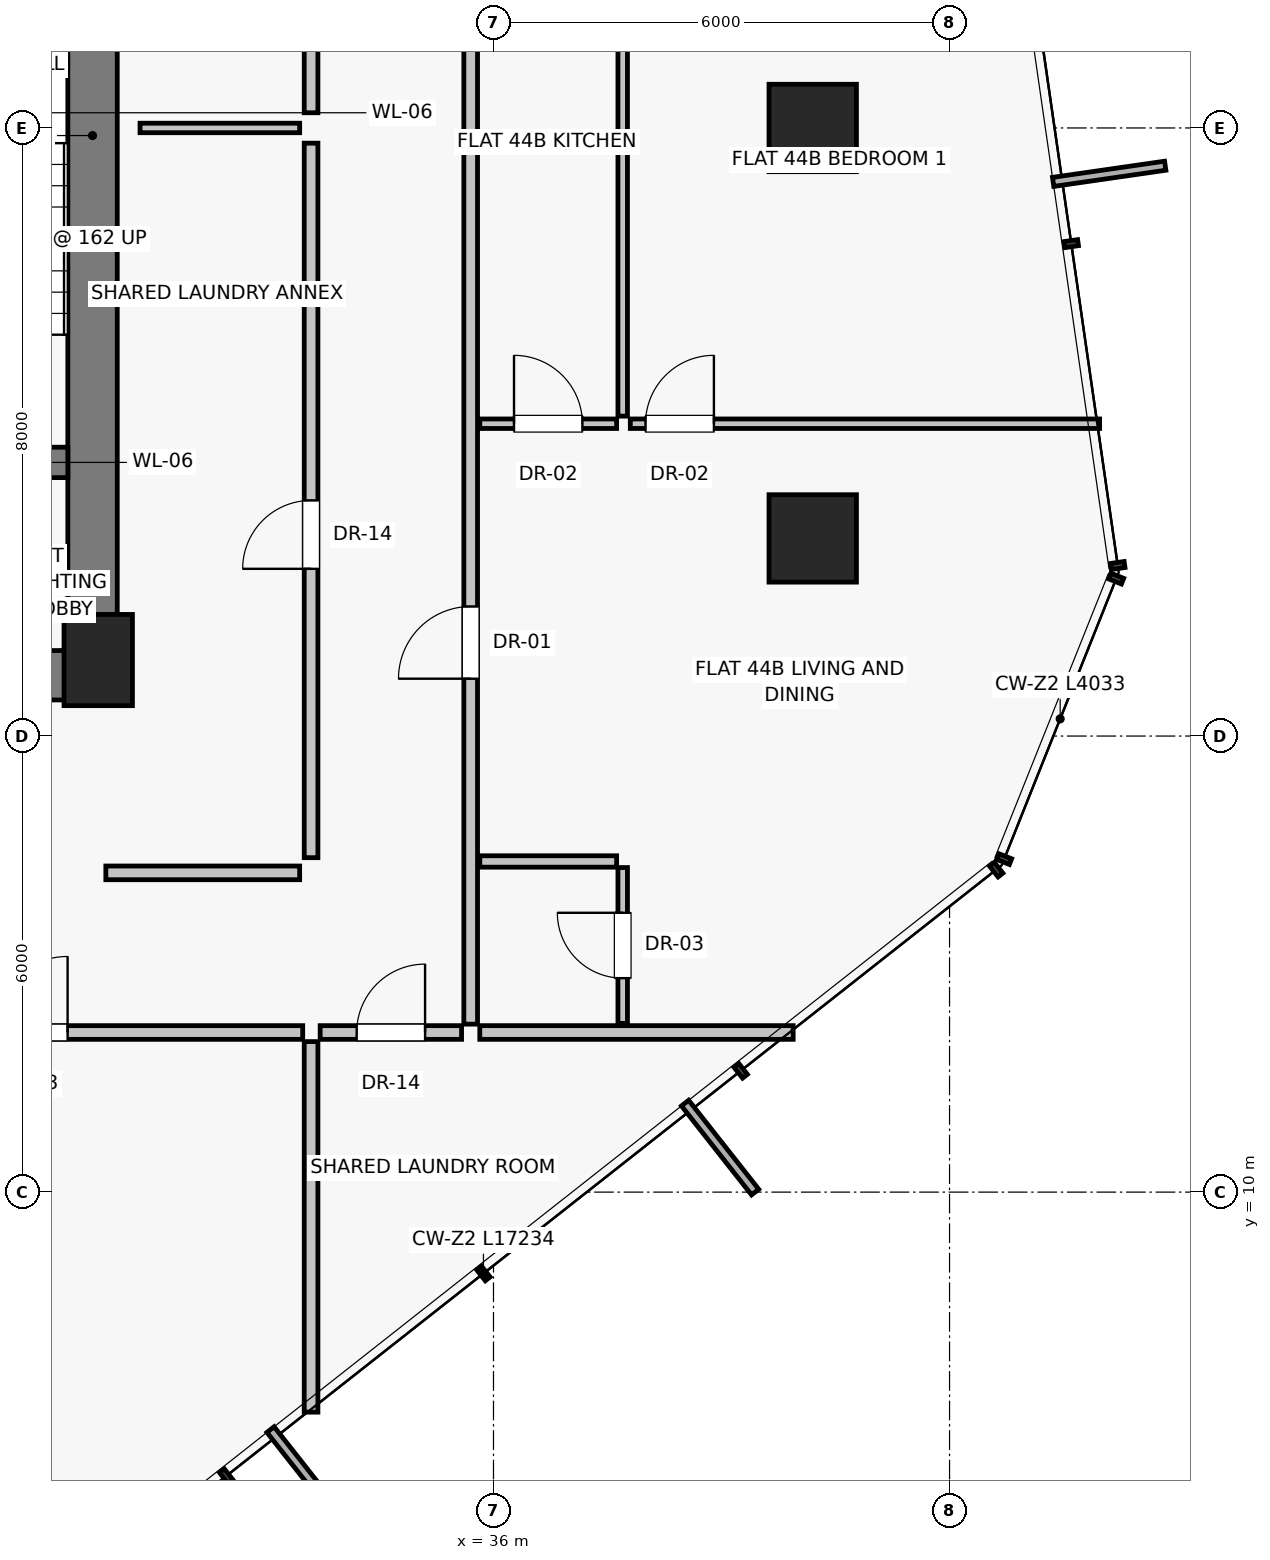
"""IFC4 building model, lengths in metres.
Left out: names, types, materials, properties, quantities, classifications, styles, units other than length and angle.
Written with IfcOpenShell. Run it as: python <this file> out.ifc"""

import sys

from ifc_helpers import new_model, si_unit, direction, frame, frame_2d, origin, origin_2d, place, context, subcontext, project, spatial, rectangle, extrude, source, transform, mapped, element, fill, save


model = new_model("IFC4")
c1 = context("Model", 3, precision=1e-05, world=origin(), true_north=direction((0.0, 1.0)))
c2 = subcontext(c1, "Body", "Model", "MODEL_VIEW")
j1 = project(units=[si_unit("LENGTHUNIT", "METRE"), si_unit("PLANEANGLEUNIT", "RADIAN")], contexts=[c1])
p1 = place(None, origin())
s1 = spatial("IfcSite", under=j1, at=p1, CompositionType="ELEMENT")
p2 = place(p1, origin())
s2 = spatial("IfcBuilding", under=s1, at=p2, CompositionType="ELEMENT")
p3 = place(p2, frame((0.0, 0.0, 155.5)))
s3 = spatial("IfcBuildingStorey", under=s2, at=p3, CompositionType="ELEMENT", Elevation=155.5)
p4 = place(p3, frame((30.8, 17.0, 0.0), z_axis=(0.0, 0.0, 1.0), x_axis=(1.0, 0.0, 0.0)))
e1 = element("IfcColumn", 1, at=p4, inside=s3, PredefinedType="PILASTER", context=c2, shape_type="SweptSolid", body=[
    extrude(rectangle(XDim=0.9, YDim=1.2, at=origin_2d()), origin(), (0.0, 0.0, 1.0), 3.25),
])
for number, where, z_axis, x_axis in (
    (2, (40.2, 18.6, 0.0), (0.0, 0.0, 1.0), (1.0, 0.0, 0.0)),
    (3, (40.2, 24.0, 0.0), (0.0, 0.0, 1.0), (1.0, 0.0, 0.0)),
):
    element("IfcColumn", number, at=place(p3, frame(where, z_axis=z_axis, x_axis=x_axis)), inside=s3, PredefinedType="COLUMN", context=c2, shape_type="SweptSolid", body=[
        extrude(rectangle(XDim=1.15, YDim=1.15, at=origin_2d()), origin(), (0.0, 0.0, 1.0), 3.25),
    ])
p5 = place(p3, frame((30.725, 16.8, 0.0), z_axis=(0.0, 0.0, 1.0), x_axis=(0.0, 1.0, 0.0)))
e4 = element("IfcWall", 4, at=p5, inside=s3, PredefinedType="SHEAR", context=c2, shape_type="SweptSolid", body=[
    extrude(rectangle(XDim=14.2, YDim=0.65, at=frame_2d((7.1, 0.0))), origin(), (0.0, 0.0, 1.0), 2.97),
])
p6 = place(p3, frame((24.95, 16.8, 0.0), z_axis=(0.0, 0.0, 1.0), x_axis=(1.0, 0.0, 0.0)))
e5 = element("IfcWall", 5, at=p6, inside=s3, PredefinedType="SHEAR", context=c2, shape_type="SweptSolid", body=[
    extrude(rectangle(XDim=5.85, YDim=0.65, at=frame_2d((2.925, 0.0))), origin(), (0.0, 0.0, 1.0), 2.97),
])
p7 = place(p6, frame((2.15, 0.0, 0.0)))
e6 = element("IfcOpeningElement", 6, at=p7, cuts=e5, PredefinedType="OPENING", context=c2, shape_type="SweptSolid", body=[
    extrude(rectangle(XDim=1.2, YDim=2.03, at=frame_2d((0.6, 1.015))), frame((0.0, 0.335, 0.0), z_axis=(0.0, -1.0, 0.0), x_axis=(1.0, 0.0, 0.0)), (0.0, 0.0, 1.0), 0.67),
])
p8 = place(p3, frame((27.0, 19.6, 0.0), z_axis=(0.0, 0.0, 1.0), x_axis=(1.0, 0.0, 0.0)))
e7 = element("IfcWall", 7, at=p8, inside=s3, PredefinedType="SHEAR", context=c2, shape_type="SweptSolid", body=[
    extrude(rectangle(XDim=3.4, YDim=0.4, at=frame_2d((1.7, 0.0))), origin(), (0.0, 0.0, 1.0), 2.97),
])
p9 = place(p8, frame((1.05, 0.0, 0.0)))
e8 = element("IfcOpeningElement", 8, at=p9, cuts=e7, PredefinedType="OPENING", context=c2, shape_type="SweptSolid", body=[
    extrude(rectangle(XDim=1.1, YDim=2.03, at=frame_2d((0.55, 1.015))), frame((0.0, 0.21, 0.0), z_axis=(0.0, -1.0, 0.0), x_axis=(1.0, 0.0, 0.0)), (0.0, 0.0, 1.0), 0.42),
])
p10 = place(p3, frame((33.6, 14.4, 0.0), z_axis=(0.0, 0.0, 1.0), x_axis=(0.0, 1.0, 0.0)))
e9 = element("IfcWall", 9, at=p10, inside=s3, PredefinedType="PARTITIONING", context=c2, shape_type="SweptSolid", body=[
    extrude(rectangle(XDim=9.4, YDim=0.18, at=frame_2d((4.7, 0.0))), origin(), (0.0, 0.0, 1.0), 2.97),
])
p11 = place(p10, frame((3.8, 0.0, 0.0)))
e10 = element("IfcOpeningElement", 10, at=p11, cuts=e9, PredefinedType="OPENING", context=c2, shape_type="SweptSolid", body=[
    extrude(rectangle(XDim=0.9, YDim=2.01, at=frame_2d((0.45, 1.005))), frame((0.0, 0.1, 0.0), z_axis=(0.0, -1.0, 0.0), x_axis=(1.0, 0.0, 0.0)), (0.0, 0.0, 1.0), 0.2),
])
p12 = place(p3, frame((33.6, 24.2, 0.0), z_axis=(0.0, 0.0, 1.0), x_axis=(0.0, 1.0, 0.0)))
e11 = element("IfcWall", 11, at=p12, inside=s3, PredefinedType="PARTITIONING", context=c2, shape_type="SweptSolid", body=[
    extrude(rectangle(XDim=9.2, YDim=0.18, at=frame_2d((4.6, 0.0))), origin(), (0.0, 0.0, 1.0), 2.97),
])
p13 = place(p12, frame((3.8, 0.0, 0.0)))
e12 = element("IfcOpeningElement", 12, at=p13, cuts=e11, PredefinedType="OPENING", context=c2, shape_type="SweptSolid", body=[
    extrude(rectangle(XDim=0.9, YDim=2.01, at=frame_2d((0.45, 1.005))), frame((0.0, 0.1, 0.0), z_axis=(0.0, -1.0, 0.0), x_axis=(1.0, 0.0, 0.0)), (0.0, 0.0, 1.0), 0.2),
])
p14 = place(p3, frame((31.35, 24.0, 0.0), z_axis=(0.0, 0.0, 1.0), x_axis=(1.0, 0.0, 0.0)))
e13 = element("IfcWall", 13, at=p14, inside=s3, PredefinedType="PARTITIONING", context=c2, shape_type="SweptSolid", body=[
    extrude(rectangle(XDim=2.1, YDim=0.125, at=frame_2d((1.05, 0.0))), origin(), (0.0, 0.0, 1.0), 2.97),
])
p15 = place(p3, frame((30.9, 14.2, 0.0), z_axis=(0.0, 0.0, 1.0), x_axis=(1.0, 0.0, 0.0)))
e14 = element("IfcWall", 14, at=p15, inside=s3, PredefinedType="PARTITIONING", context=c2, shape_type="SweptSolid", body=[
    extrude(rectangle(XDim=2.55, YDim=0.18, at=frame_2d((1.275, 0.0))), origin(), (0.0, 0.0, 1.0), 2.97),
])
p16 = place(p3, frame((33.6, 11.98, 0.0), z_axis=(0.0, 0.0, 1.0), x_axis=(0.0, -1.0, 0.0)))
e15 = element("IfcWall", 15, at=p16, inside=s3, PredefinedType="PARTITIONING", context=c2, shape_type="SweptSolid", body=[
    extrude(rectangle(XDim=4.875, YDim=0.18, at=frame_2d((2.437, 0.0))), origin(), (0.0, 0.0, 1.0), 2.97),
])
p17 = place(p3, frame((26.304, 12.1, 0.0), z_axis=(0.0, 0.0, 1.0), x_axis=(1.0, 0.0, 0.0)))
e16 = element("IfcWall", 16, at=p17, inside=s3, PredefinedType="PARTITIONING", context=c2, shape_type="SweptSolid", body=[
    extrude(rectangle(XDim=7.186, YDim=0.18, at=frame_2d((3.593, 0.0))), origin(), (0.0, 0.0, 1.0), 2.55),
])
p18 = place(p17, frame((3.093, 0.0, 0.0)))
e17 = element("IfcOpeningElement", 17, at=p18, cuts=e16, PredefinedType="OPENING", context=c2, shape_type="SweptSolid", body=[
    extrude(rectangle(XDim=1.0, YDim=2.01, at=frame_2d((0.5, 1.005))), frame((0.0, 0.1, 0.0), z_axis=(0.0, -1.0, 0.0), x_axis=(1.0, 0.0, 0.0)), (0.0, 0.0, 1.0), 0.2),
])
p19 = place(p3, frame((35.82, 12.1, 0.0), z_axis=(0.0, 0.0, 1.0), x_axis=(1.0, 0.0, 0.0)))
e18 = element("IfcWall", 18, at=p19, inside=s3, PredefinedType="PARTITIONING", context=c2, shape_type="SweptSolid", body=[
    extrude(rectangle(XDim=4.122, YDim=0.18, at=frame_2d((2.061, 0.0))), origin(), (0.0, 0.0, 1.0), 2.97),
])
p20 = place(p3, frame((35.7, 12.21, 0.0), z_axis=(0.0, 0.0, 1.0), x_axis=(0.0, 1.0, 0.0)))
e19 = element("IfcWall", 19, at=p20, inside=s3, PredefinedType="PARTITIONING", context=c2, shape_type="SweptSolid", body=[
    extrude(rectangle(XDim=14.082, YDim=0.18, at=frame_2d((7.041, 0.0))), origin(), (0.0, 0.0, 1.0), 2.55),
])
p21 = place(p20, frame((4.544, 0.0, 0.0)))
e20 = element("IfcOpeningElement", 20, at=p21, cuts=e19, PredefinedType="OPENING", context=c2, shape_type="SweptSolid", body=[
    extrude(rectangle(XDim=0.95, YDim=2.02, at=frame_2d((0.475, 1.01))), frame((0.0, 0.1, 0.0), z_axis=(0.0, -1.0, 0.0), x_axis=(1.0, 0.0, 0.0)), (0.0, 0.0, 1.0), 0.2),
])
p22 = place(p3, frame((35.82, 14.35, 0.0), z_axis=(0.0, 0.0, 1.0), x_axis=(1.0, 0.0, 0.0)))
e21 = element("IfcWall", 21, at=p22, inside=s3, PredefinedType="PARTITIONING", context=c2, shape_type="SweptSolid", body=[
    extrude(rectangle(XDim=1.8, YDim=0.15, at=frame_2d((0.9, 0.0))), origin(), (0.0, 0.0, 1.0), 2.97),
])
p23 = place(p3, frame((37.7, 12.22, 0.0), z_axis=(0.0, 0.0, 1.0), x_axis=(0.0, 1.0, 0.0)))
e22 = element("IfcWall", 22, at=p23, inside=s3, PredefinedType="PARTITIONING", context=c2, shape_type="SweptSolid", body=[
    extrude(rectangle(XDim=2.05, YDim=0.125, at=frame_2d((1.025, 0.0))), origin(), (0.0, 0.0, 1.0), 2.97),
])
p24 = place(p23, frame((0.595, 0.0, 0.0)))
e23 = element("IfcOpeningElement", 23, at=p24, cuts=e22, PredefinedType="OPENING", context=c2, shape_type="SweptSolid", body=[
    extrude(rectangle(XDim=0.86, YDim=2.01, at=frame_2d((0.43, 1.005))), frame((0.0, 0.073, 0.0), z_axis=(0.0, -1.0, 0.0), x_axis=(1.0, 0.0, 0.0)), (0.0, 0.0, 1.0), 0.145),
])
p25 = place(p3, frame((35.82, 20.109, 0.0), z_axis=(0.0, 0.0, 1.0), x_axis=(1.0, 0.0, 0.0)))
e24 = element("IfcWall", 24, at=p25, inside=s3, PredefinedType="PARTITIONING", context=c2, shape_type="SweptSolid", body=[
    extrude(rectangle(XDim=1.8, YDim=0.125, at=frame_2d((0.9, 0.0))), origin(), (0.0, 0.0, 1.0), 2.97),
])
p26 = place(p25, frame((0.45, 0.0, 0.0)))
e25 = element("IfcOpeningElement", 25, at=p26, cuts=e24, PredefinedType="OPENING", context=c2, shape_type="SweptSolid", body=[
    extrude(rectangle(XDim=0.9, YDim=2.01, at=frame_2d((0.45, 1.005))), frame((0.0, 0.073, 0.0), z_axis=(0.0, -1.0, 0.0), x_axis=(1.0, 0.0, 0.0)), (0.0, 0.0, 1.0), 0.145),
])
p27 = place(p3, frame((37.7, 20.209, 0.0), z_axis=(0.0, 0.0, 1.0), x_axis=(0.0, 1.0, 0.0)))
e26 = element("IfcWall", 26, at=p27, inside=s3, PredefinedType="PARTITIONING", context=c2, shape_type="SweptSolid", body=[
    extrude(rectangle(XDim=6.073, YDim=0.125, at=frame_2d((3.037, 0.0))), origin(), (0.0, 0.0, 1.0), 2.97),
])
p28 = place(p3, frame((37.8, 20.109, 0.0), z_axis=(0.0, 0.0, 1.0), x_axis=(1.0, 0.0, 0.0)))
e27 = element("IfcWall", 27, at=p28, inside=s3, PredefinedType="PARTITIONING", context=c2, shape_type="SweptSolid", body=[
    extrude(rectangle(XDim=6.174, YDim=0.125, at=frame_2d((3.087, 0.0))), origin(), (0.0, 0.0, 1.0), 2.97),
])
p29 = place(p28, frame((0.2, 0.0, 0.0)))
e28 = element("IfcOpeningElement", 28, at=p29, cuts=e27, PredefinedType="OPENING", context=c2, shape_type="SweptSolid", body=[
    extrude(rectangle(XDim=0.9, YDim=2.01, at=frame_2d((0.45, 1.005))), frame((0.0, 0.073, 0.0), z_axis=(0.0, -1.0, 0.0), x_axis=(1.0, 0.0, 0.0)), (0.0, 0.0, 1.0), 0.145),
])
p30 = place(p3, frame((33.72, 12.1, 0.0), z_axis=(0.0, 0.0, 1.0), x_axis=(1.0, 0.0, 0.0)))
e29 = element("IfcWall", 29, at=p30, inside=s3, PredefinedType="PARTITIONING", context=c2, shape_type="SweptSolid", body=[
    extrude(rectangle(XDim=1.86, YDim=0.18, at=frame_2d((0.93, 0.0))), origin(), (0.0, 0.0, 1.0), 2.97),
])
p31 = place(p30, frame((0.48, 0.0, 0.0)))
e30 = element("IfcOpeningElement", 30, at=p31, cuts=e29, PredefinedType="OPENING", context=c2, shape_type="SweptSolid", body=[
    extrude(rectangle(XDim=0.9, YDim=2.01, at=frame_2d((0.45, 1.005))), frame((0.0, 0.1, 0.0), z_axis=(0.0, -1.0, 0.0), x_axis=(1.0, 0.0, 0.0)), (0.0, 0.0, 1.0), 0.2),
])
m1 = source(origin(), c2, "Body", "SweptSolid", [
    extrude(rectangle(XDim=0.9, YDim=2.01, at=frame_2d((0.45, 1.005))), frame((0.0, 0.025, 0.0), z_axis=(0.0, -1.0, 0.0), x_axis=(1.0, 0.0, 0.0)), (0.0, 0.0, 1.0), 0.05),
])
p32 = place(p11, origin())
e31 = element("IfcDoor", 31, at=p32, inside=s3, OperationType="SINGLE_SWING_LEFT", PredefinedType="DOOR", context=c2, shape_type="MappedRepresentation", body=[
    mapped(m1, transform((0.0, 0.0, 0.0), scale=1.0)),
])
fill(e10, e31)
m2 = source(origin(), c2, "Body", "SweptSolid", [
    extrude(rectangle(XDim=1.0, YDim=2.01, at=frame_2d((0.5, 1.005))), frame((0.0, 0.025, 0.0), z_axis=(0.0, -1.0, 0.0), x_axis=(1.0, 0.0, 0.0)), (0.0, 0.0, 1.0), 0.05),
])
p33 = place(p18, origin())
e32 = element("IfcDoor", 32, at=p33, inside=s3, OperationType="SINGLE_SWING_RIGHT", PredefinedType="DOOR", context=c2, shape_type="MappedRepresentation", body=[
    mapped(m2, transform((0.0, 0.0, 0.0), scale=1.0)),
])
fill(e17, e32)
m3 = source(origin(), c2, "Body", "SweptSolid", [
    extrude(rectangle(XDim=0.95, YDim=2.02, at=frame_2d((0.475, 1.01))), frame((0.0, 0.025, 0.0), z_axis=(0.0, -1.0, 0.0), x_axis=(1.0, 0.0, 0.0)), (0.0, 0.0, 1.0), 0.05),
])
p34 = place(p21, origin())
e33 = element("IfcDoor", 33, at=p34, inside=s3, OperationType="SINGLE_SWING_LEFT", PredefinedType="DOOR", context=c2, shape_type="MappedRepresentation", body=[
    mapped(m3, transform((0.0, 0.0, 0.0), scale=1.0)),
])
fill(e20, e33)
m4 = source(origin(), c2, "Body", "SweptSolid", [
    extrude(rectangle(XDim=0.86, YDim=2.01, at=frame_2d((0.43, 1.005))), frame((0.0, 0.025, 0.0), z_axis=(0.0, -1.0, 0.0), x_axis=(1.0, 0.0, 0.0)), (0.0, 0.0, 1.0), 0.05),
])
p35 = place(p24, origin())
e34 = element("IfcDoor", 34, at=p35, inside=s3, OperationType="SINGLE_SWING_RIGHT", PredefinedType="DOOR", context=c2, shape_type="MappedRepresentation", body=[
    mapped(m4, transform((0.0, 0.0, 0.0), scale=1.0)),
])
fill(e23, e34)
p36 = place(p26, origin())
e35 = element("IfcDoor", 35, at=p36, inside=s3, OperationType="SINGLE_SWING_LEFT", PredefinedType="DOOR", context=c2, shape_type="MappedRepresentation", body=[
    mapped(m1, transform((0.0, 0.0, 0.0), scale=1.0)),
])
fill(e25, e35)
p37 = place(p29, origin())
e36 = element("IfcDoor", 36, at=p37, inside=s3, OperationType="SINGLE_SWING_RIGHT", PredefinedType="DOOR", context=c2, shape_type="MappedRepresentation", body=[
    mapped(m1, transform((0.0, 0.0, 0.0), scale=1.0)),
])
fill(e28, e36)
p38 = place(p31, origin())
e37 = element("IfcDoor", 37, at=p38, inside=s3, OperationType="SINGLE_SWING_RIGHT", PredefinedType="DOOR", context=c2, shape_type="MappedRepresentation", body=[
    mapped(m1, transform((0.0, 0.0, 0.0), scale=1.0)),
])
fill(e30, e37)
save(model, sys.argv[1])
